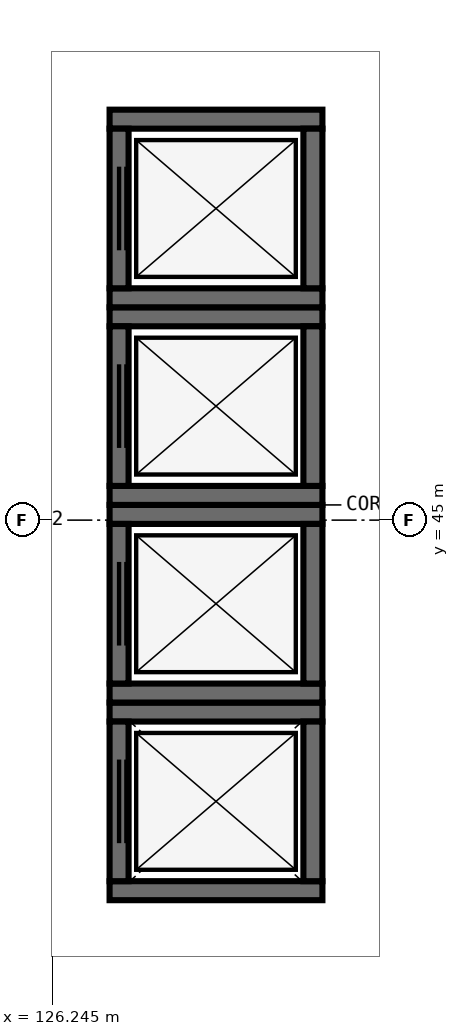
"""IFC4 building model, lengths in metres.
Left out: names, types, materials, properties, quantities, classifications, styles, units other than length and angle.
Written with IfcOpenShell. Run it as: python <this file> out.ifc"""

import sys

from ifc_helpers import new_model, si_unit, direction, frame, frame_2d, origin, place, context, subcontext, project, spatial, rectangle, extrude, element, fill, save


model = new_model("IFC4")
c1 = context("Model", 3, precision=1e-05, world=origin(), true_north=direction((0.0, 1.0)))
c2 = subcontext(c1, "Body", "Model", "MODEL_VIEW")
j1 = project(units=[si_unit("LENGTHUNIT", "METRE"), si_unit("PLANEANGLEUNIT", "RADIAN")], contexts=[c1])
p1 = place(None, origin())
s1 = spatial("IfcSite", under=j1, at=p1, CompositionType="ELEMENT")
p2 = place(p1, origin())
s2 = spatial("IfcBuilding", under=s1, at=p2, CompositionType="ELEMENT")
p3 = place(p2, frame((0.0, 0.0, 23.4)))
s3 = spatial("IfcBuildingStorey", under=s2, at=p3, CompositionType="ELEMENT", Elevation=23.4)
for number, where, z_axis, x_axis in (
    (1, (127.0, 40.125, 0.0), (0.0, 0.0, 1.0), (1.0, 0.0, 0.0)),
    (2, (129.8, 42.475, 0.0), (0.0, 0.0, 1.0), (-1.0, 0.0, 0.0)),
):
    element("IfcWall", number, at=place(p3, frame(where, z_axis=z_axis, x_axis=x_axis)), inside=s3, PredefinedType="SHEAR", context=c2, shape_type="SweptSolid", body=[
        extrude(rectangle(XDim=2.8, YDim=0.25, at=frame_2d((1.4, 0.0))), origin(), (0.0, 0.0, 1.0), 3.85),
    ])
p4 = place(p3, frame((127.125, 42.35, 0.0), z_axis=(0.0, 0.0, 1.0), x_axis=(0.0, -1.0, 0.0)))
e3 = element("IfcWall", 3, at=p4, inside=s3, PredefinedType="SHEAR", context=c2, shape_type="SweptSolid", body=[
    extrude(rectangle(XDim=2.1, YDim=0.25, at=frame_2d((1.05, 0.0))), origin(), (0.0, 0.0, 1.0), 3.85),
])
p5 = place(p4, frame((0.5, 0.0, 0.0)))
e4 = element("IfcOpeningElement", 4, at=p5, cuts=e3, PredefinedType="OPENING", context=c2, shape_type="SweptSolid", body=[
    extrude(rectangle(XDim=1.1, YDim=2.2, at=frame_2d((0.55, 1.1))), frame((0.0, 0.14, 0.0), z_axis=(0.0, -1.0, 0.0), x_axis=(1.0, 0.0, 0.0)), (0.0, 0.0, 1.0), 0.28),
])
p6 = place(p3, frame((129.675, 40.25, 0.0), z_axis=(0.0, 0.0, 1.0), x_axis=(0.0, 1.0, 0.0)))
e5 = element("IfcWall", 5, at=p6, inside=s3, PredefinedType="SHEAR", context=c2, shape_type="SweptSolid", body=[
    extrude(rectangle(XDim=2.1, YDim=0.25, at=frame_2d((1.05, 0.0))), origin(), (0.0, 0.0, 1.0), 3.85),
])
for number, where, z_axis, x_axis in (
    (6, (127.0, 42.725, 0.0), (0.0, 0.0, 1.0), (1.0, 0.0, 0.0)),
    (7, (129.8, 45.075, 0.0), (0.0, 0.0, 1.0), (-1.0, 0.0, 0.0)),
):
    element("IfcWall", number, at=place(p3, frame(where, z_axis=z_axis, x_axis=x_axis)), inside=s3, PredefinedType="SHEAR", context=c2, shape_type="SweptSolid", body=[
        extrude(rectangle(XDim=2.8, YDim=0.25, at=frame_2d((1.4, 0.0))), origin(), (0.0, 0.0, 1.0), 3.85),
    ])
p7 = place(p3, frame((127.125, 44.95, 0.0), z_axis=(0.0, 0.0, 1.0), x_axis=(0.0, -1.0, 0.0)))
e8 = element("IfcWall", 8, at=p7, inside=s3, PredefinedType="SHEAR", context=c2, shape_type="SweptSolid", body=[
    extrude(rectangle(XDim=2.1, YDim=0.25, at=frame_2d((1.05, 0.0))), origin(), (0.0, 0.0, 1.0), 3.85),
])
p8 = place(p7, frame((0.5, 0.0, 0.0)))
e9 = element("IfcOpeningElement", 9, at=p8, cuts=e8, PredefinedType="OPENING", context=c2, shape_type="SweptSolid", body=[
    extrude(rectangle(XDim=1.1, YDim=2.2, at=frame_2d((0.55, 1.1))), frame((0.0, 0.14, 0.0), z_axis=(0.0, -1.0, 0.0), x_axis=(1.0, 0.0, 0.0)), (0.0, 0.0, 1.0), 0.28),
])
p9 = place(p3, frame((129.675, 42.85, 0.0), z_axis=(0.0, 0.0, 1.0), x_axis=(0.0, 1.0, 0.0)))
e10 = element("IfcWall", 10, at=p9, inside=s3, PredefinedType="SHEAR", context=c2, shape_type="SweptSolid", body=[
    extrude(rectangle(XDim=2.1, YDim=0.25, at=frame_2d((1.05, 0.0))), origin(), (0.0, 0.0, 1.0), 3.85),
])
for number, where, z_axis, x_axis in (
    (11, (127.0, 45.325, 0.0), (0.0, 0.0, 1.0), (1.0, 0.0, 0.0)),
    (12, (129.8, 47.675, 0.0), (0.0, 0.0, 1.0), (-1.0, 0.0, 0.0)),
):
    element("IfcWall", number, at=place(p3, frame(where, z_axis=z_axis, x_axis=x_axis)), inside=s3, PredefinedType="SHEAR", context=c2, shape_type="SweptSolid", body=[
        extrude(rectangle(XDim=2.8, YDim=0.25, at=frame_2d((1.4, 0.0))), origin(), (0.0, 0.0, 1.0), 3.85),
    ])
p10 = place(p3, frame((127.125, 47.55, 0.0), z_axis=(0.0, 0.0, 1.0), x_axis=(0.0, -1.0, 0.0)))
e13 = element("IfcWall", 13, at=p10, inside=s3, PredefinedType="SHEAR", context=c2, shape_type="SweptSolid", body=[
    extrude(rectangle(XDim=2.1, YDim=0.25, at=frame_2d((1.05, 0.0))), origin(), (0.0, 0.0, 1.0), 3.85),
])
p11 = place(p10, frame((0.5, 0.0, 0.0)))
e14 = element("IfcOpeningElement", 14, at=p11, cuts=e13, PredefinedType="OPENING", context=c2, shape_type="SweptSolid", body=[
    extrude(rectangle(XDim=1.1, YDim=2.2, at=frame_2d((0.55, 1.1))), frame((0.0, 0.14, 0.0), z_axis=(0.0, -1.0, 0.0), x_axis=(1.0, 0.0, 0.0)), (0.0, 0.0, 1.0), 0.28),
])
p12 = place(p3, frame((129.675, 45.45, 0.0), z_axis=(0.0, 0.0, 1.0), x_axis=(0.0, 1.0, 0.0)))
e15 = element("IfcWall", 15, at=p12, inside=s3, PredefinedType="SHEAR", context=c2, shape_type="SweptSolid", body=[
    extrude(rectangle(XDim=2.1, YDim=0.25, at=frame_2d((1.05, 0.0))), origin(), (0.0, 0.0, 1.0), 3.85),
])
for number, where, z_axis, x_axis in (
    (16, (127.0, 47.925, 0.0), (0.0, 0.0, 1.0), (1.0, 0.0, 0.0)),
    (17, (129.8, 50.275, 0.0), (0.0, 0.0, 1.0), (-1.0, 0.0, 0.0)),
):
    element("IfcWall", number, at=place(p3, frame(where, z_axis=z_axis, x_axis=x_axis)), inside=s3, PredefinedType="SHEAR", context=c2, shape_type="SweptSolid", body=[
        extrude(rectangle(XDim=2.8, YDim=0.25, at=frame_2d((1.4, 0.0))), origin(), (0.0, 0.0, 1.0), 3.85),
    ])
p13 = place(p3, frame((127.125, 50.15, 0.0), z_axis=(0.0, 0.0, 1.0), x_axis=(0.0, -1.0, 0.0)))
e18 = element("IfcWall", 18, at=p13, inside=s3, PredefinedType="SHEAR", context=c2, shape_type="SweptSolid", body=[
    extrude(rectangle(XDim=2.1, YDim=0.25, at=frame_2d((1.05, 0.0))), origin(), (0.0, 0.0, 1.0), 3.85),
])
p14 = place(p13, frame((0.5, 0.0, 0.0)))
e19 = element("IfcOpeningElement", 19, at=p14, cuts=e18, PredefinedType="OPENING", context=c2, shape_type="SweptSolid", body=[
    extrude(rectangle(XDim=1.1, YDim=2.2, at=frame_2d((0.55, 1.1))), frame((0.0, 0.14, 0.0), z_axis=(0.0, -1.0, 0.0), x_axis=(1.0, 0.0, 0.0)), (0.0, 0.0, 1.0), 0.28),
])
p15 = place(p3, frame((129.675, 48.05, 0.0), z_axis=(0.0, 0.0, 1.0), x_axis=(0.0, 1.0, 0.0)))
e20 = element("IfcWall", 20, at=p15, inside=s3, PredefinedType="SHEAR", context=c2, shape_type="SweptSolid", body=[
    extrude(rectangle(XDim=2.1, YDim=0.25, at=frame_2d((1.05, 0.0))), origin(), (0.0, 0.0, 1.0), 3.85),
])
p16 = place(p5, origin())
e21 = element("IfcDoor", 21, at=p16, inside=s3, OperationType="DOUBLE_DOOR_SLIDING", PredefinedType="DOOR", context=c2, shape_type="SweptSolid", body=[
    extrude(rectangle(XDim=1.1, YDim=2.2, at=frame_2d((0.55, 1.1))), frame((0.0, 0.025, 0.0), z_axis=(0.0, -1.0, 0.0), x_axis=(1.0, 0.0, 0.0)), (0.0, 0.0, 1.0), 0.05),
])
fill(e4, e21)
p17 = place(p8, origin())
e22 = element("IfcDoor", 22, at=p17, inside=s3, OperationType="DOUBLE_DOOR_SLIDING", PredefinedType="DOOR", context=c2, shape_type="SweptSolid", body=[
    extrude(rectangle(XDim=1.1, YDim=2.2, at=frame_2d((0.55, 1.1))), frame((0.0, 0.025, 0.0), z_axis=(0.0, -1.0, 0.0), x_axis=(1.0, 0.0, 0.0)), (0.0, 0.0, 1.0), 0.05),
])
fill(e9, e22)
p18 = place(p11, origin())
e23 = element("IfcDoor", 23, at=p18, inside=s3, OperationType="DOUBLE_DOOR_SLIDING", PredefinedType="DOOR", context=c2, shape_type="SweptSolid", body=[
    extrude(rectangle(XDim=1.1, YDim=2.2, at=frame_2d((0.55, 1.1))), frame((0.0, 0.025, 0.0), z_axis=(0.0, -1.0, 0.0), x_axis=(1.0, 0.0, 0.0)), (0.0, 0.0, 1.0), 0.05),
])
fill(e14, e23)
p19 = place(p14, origin())
e24 = element("IfcDoor", 24, at=p19, inside=s3, OperationType="DOUBLE_DOOR_SLIDING", PredefinedType="DOOR", context=c2, shape_type="SweptSolid", body=[
    extrude(rectangle(XDim=1.1, YDim=2.2, at=frame_2d((0.55, 1.1))), frame((0.0, 0.025, 0.0), z_axis=(0.0, -1.0, 0.0), x_axis=(1.0, 0.0, 0.0)), (0.0, 0.0, 1.0), 0.05),
])
fill(e19, e24)
save(model, sys.argv[1])
